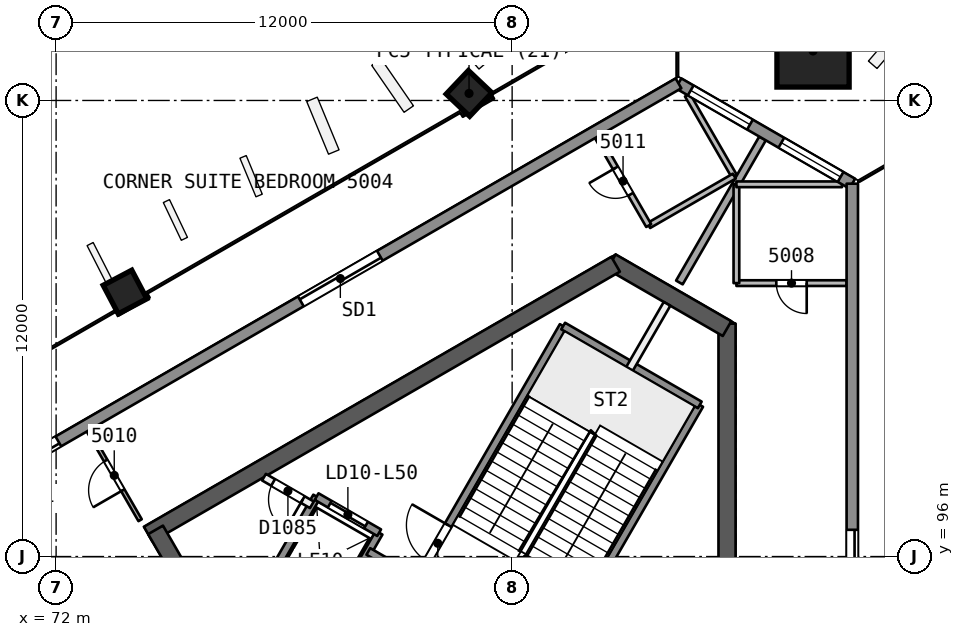
"""IFC4 building model, lengths in metres.
Left out: names, types, materials, properties, quantities, classifications, styles, units other than length and angle.
Written with IfcOpenShell. Run it as: python <this file> out.ifc"""

import sys

from ifc_helpers import new_model, si_unit, direction, frame, frame_2d, origin, origin_2d, place, context, subcontext, project, spatial, rectangle, extrude, element, fill, save


model = new_model("IFC4")
c1 = context("Model", 3, precision=1e-05, world=origin(), true_north=direction((0.0, 1.0)))
c2 = subcontext(c1, "Body", "Model", "MODEL_VIEW")
j1 = project(units=[si_unit("LENGTHUNIT", "METRE"), si_unit("PLANEANGLEUNIT", "RADIAN")], contexts=[c1])
p1 = place(None, origin())
s1 = spatial("IfcSite", under=j1, at=p1, CompositionType="ELEMENT")
p2 = place(p1, origin())
s2 = spatial("IfcBuilding", under=s1, at=p2, CompositionType="ELEMENT")
p3 = place(p2, frame((0.0, 0.0, 205.8)))
s3 = spatial("IfcBuildingStorey", under=s2, at=p3, CompositionType="ELEMENT", Elevation=205.8)
p4 = place(p3, frame((89.655, 88.019, 0.0), z_axis=(0.0, 0.0, 1.0), x_axis=(0.0, 1.0, 0.0)))
e1 = element("IfcWall", 1, at=p4, inside=s3, PredefinedType="SHEAR", context=c2, shape_type="SweptSolid", body=[
    extrude(rectangle(XDim=14.108, YDim=0.45, at=frame_2d((7.054, 0.0))), origin(), (0.0, 0.0, 1.0), 3.7),
])
p5 = place(p3, frame((89.655, 101.998, 0.0), z_axis=(0.0, 0.0, 1.0), x_axis=(-0.866042179588, 0.49997094233, 0.0)))
e2 = element("IfcWall", 2, at=p5, inside=s3, PredefinedType="SHEAR", context=c2, shape_type="SweptSolid", body=[
    extrude(rectangle(XDim=3.515, YDim=0.45, at=frame_2d((1.758, 0.0))), origin(), (0.0, 0.0, 1.0), 3.7),
])
p6 = place(p3, frame((86.723, 103.69, 0.0), z_axis=(0.0, 0.0, 1.0), x_axis=(-0.866022713978, -0.500004658852, 0.0)))
e3 = element("IfcWall", 3, at=p6, inside=s3, PredefinedType="SHEAR", context=c2, shape_type="SweptSolid", body=[
    extrude(rectangle(XDim=14.203, YDim=0.45, at=frame_2d((7.102, 0.0))), origin(), (0.0, 0.0, 1.0), 3.7),
])
p7 = place(p3, frame((74.617, 96.701, 0.0), z_axis=(0.0, 0.0, 1.0), x_axis=(0.499994385119, -0.866028645513, 0.0)))
e4 = element("IfcWall", 4, at=p7, inside=s3, PredefinedType="SHEAR", context=c2, shape_type="SweptSolid", body=[
    extrude(rectangle(XDim=10.155, YDim=0.45, at=frame_2d((5.077, 0.0))), origin(), (0.0, 0.0, 1.0), 3.7),
])
p8 = place(p7, frame((8.005, 0.0, 0.0)))
e5 = element("IfcOpeningElement", 5, at=p8, cuts=e4, PredefinedType="OPENING", context=c2, shape_type="SweptSolid", body=[
    extrude(rectangle(XDim=1.2, YDim=2.1, at=frame_2d((0.6, 1.05))), frame((0.0, 0.235, 0.0), z_axis=(0.0, -1.0, 0.0), x_axis=(1.0, 0.0, 0.0)), (0.0, 0.0, 1.0), 0.471),
])
p9 = place(p3, frame((91.939, 109.339, 0.0), z_axis=(-0.017607037296, -0.030466109479, 0.999380712447), x_axis=(0.500064653071, 0.865272876704, 0.035187946645)))
e6 = element("IfcColumn", 6, at=p9, inside=s3, PredefinedType="COLUMN", context=c2, shape_type="SweptSolid", body=[
    extrude(rectangle(XDim=1.9, YDim=1.9, at=origin_2d()), origin(), (0.0, 0.0, 1.0), 3.702),
])
p10 = place(p3, frame((82.876, 108.219, 0.0), z_axis=(-0.008376454378, -0.028163354484, 0.999568237028), x_axis=(0.86585218107, 0.499844611273, 0.021339285781)))
e7 = element("IfcColumn", 7, at=p10, inside=s3, PredefinedType="COLUMN", context=c2, shape_type="SweptSolid", body=[
    extrude(rectangle(XDim=0.85, YDim=0.85, at=origin_2d()), origin(), (0.0, 0.0, 1.0), 3.702),
])
p11 = place(p3, frame((73.813, 102.987, 0.0), z_axis=(0.000857578916, -0.022824792675, 0.999739112668), x_axis=(0.866059992904, 0.499826241631, 0.010668498825)))
e8 = element("IfcColumn", 8, at=p11, inside=s3, PredefinedType="COLUMN", context=c2, shape_type="SweptSolid", body=[
    extrude(rectangle(XDim=0.85, YDim=0.85, at=origin_2d()), origin(), (0.0, 0.0, 1.0), 3.701),
])
p12 = place(p3, frame((92.802, 103.194, 0.0), z_axis=(0.0, 0.0, 1.0), x_axis=(-1.0, 0.0, 0.0)))
e9 = element("IfcWall", 9, at=p12, inside=s3, PredefinedType="PARTITIONING", context=c2, shape_type="SweptSolid", body=[
    extrude(rectangle(XDim=2.9, YDim=0.15, at=frame_2d((1.45, 0.0))), origin(), (0.0, 0.0, 1.0), 3.3),
])
p13 = place(p12, frame((1.05, 0.0, 0.0)))
e10 = element("IfcOpeningElement", 10, at=p13, cuts=e9, PredefinedType="OPENING", context=c2, shape_type="SweptSolid", body=[
    extrude(rectangle(XDim=0.8, YDim=2.1, at=frame_2d((0.4, 1.05))), frame((0.0, 0.085, 0.0), z_axis=(0.0, -1.0, 0.0), x_axis=(1.0, 0.0, 0.0)), (0.0, 0.0, 1.0), 0.171),
])
p14 = place(p3, frame((89.902, 103.194, 0.0), z_axis=(0.0, 0.0, 1.0), x_axis=(0.0, 1.0, 0.0)))
e11 = element("IfcWall", 11, at=p14, inside=s3, PredefinedType="PARTITIONING", context=c2, shape_type="SweptSolid", body=[
    extrude(rectangle(XDim=2.6, YDim=0.15, at=frame_2d((1.3, 0.0))), origin(), (0.0, 0.0, 1.0), 3.3),
])
p15 = place(p3, frame((89.902, 105.794, 0.0), z_axis=(0.0, 0.0, 1.0), x_axis=(1.0, 0.0, 0.0)))
e12 = element("IfcWall", 12, at=p15, inside=s3, PredefinedType="PARTITIONING", context=c2, shape_type="SweptSolid", body=[
    extrude(rectangle(XDim=2.78, YDim=0.15, at=frame_2d((1.39, 0.0))), origin(), (0.0, 0.0, 1.0), 3.3),
])
p16 = place(p3, frame((90.59, 107.002, 0.0), z_axis=(0.0, 0.0, 1.0), x_axis=(-0.500002498361, -0.86602396135, 0.0)))
e13 = element("IfcWall", 13, at=p16, inside=s3, PredefinedType="PARTITIONING", context=c2, shape_type="SweptSolid", body=[
    extrude(rectangle(XDim=4.377, YDim=0.2, at=frame_2d((2.188, 0.0))), origin(), (0.0, 0.0, 1.0), 3.3),
])
p17 = place(p3, frame((74.21, 96.956, 0.0), z_axis=(0.0, 0.0, 1.0), x_axis=(-0.499957886064, 0.866049716911, 0.0)))
e14 = element("IfcWall", 14, at=p17, inside=s3, PredefinedType="PARTITIONING", context=c2, shape_type="SweptSolid", body=[
    extrude(rectangle(XDim=2.723, YDim=0.1, at=frame_2d((1.361, 0.0))), origin(), (0.0, 0.0, 1.0), 3.3),
])
p18 = place(p17, frame((0.911, 0.0, 0.0)))
e15 = element("IfcOpeningElement", 15, at=p18, cuts=e14, PredefinedType="OPENING", context=c2, shape_type="SweptSolid", body=[
    extrude(rectangle(XDim=0.9, YDim=2.1, at=frame_2d((0.45, 1.05))), frame((0.0, 0.061, 0.0), z_axis=(0.0, -1.0, 0.0), x_axis=(1.0, 0.0, 0.0)), (0.0, 0.0, 1.0), 0.121),
])
p19 = place(p3, frame((69.339, 97.287, 0.0), z_axis=(0.0, 0.0, 1.0), x_axis=(0.499993653641, -0.866029067825, 0.0)))
e16 = element("IfcWall", 16, at=p19, inside=s3, PredefinedType="PARTITIONING", context=c2, shape_type="SweptSolid", body=[
    extrude(rectangle(XDim=10.702, YDim=0.2, at=frame_2d((5.351, 0.0))), origin(), (0.0, 0.0, 1.0), 3.3),
])
p20 = place(p3, frame((88.613, 108.143, 0.0), z_axis=(0.0, 0.0, 1.0), x_axis=(0.500028332303, -0.866009045504, 0.0)))
e17 = element("IfcWall", 17, at=p20, inside=s3, PredefinedType="PARTITIONING", context=c2, shape_type="SweptSolid", body=[
    extrude(rectangle(XDim=2.464, YDim=0.15, at=frame_2d((1.232, 0.0))), origin(), (0.0, 0.0, 1.0), 3.3),
])
p21 = place(p3, frame((89.845, 106.009, 0.0), z_axis=(0.0, 0.0, 1.0), x_axis=(-0.865997922154, -0.500047596559, 0.0)))
e18 = element("IfcWall", 18, at=p21, inside=s3, PredefinedType="PARTITIONING", context=c2, shape_type="SweptSolid", body=[
    extrude(rectangle(XDim=2.6, YDim=0.15, at=frame_2d((1.3, 0.0))), origin(), (0.0, 0.0, 1.0), 3.3),
])
p22 = place(p3, frame((87.594, 104.709, 0.0), z_axis=(0.0, 0.0, 1.0), x_axis=(-0.500077242023, 0.865980803489, 0.0)))
e19 = element("IfcWall", 19, at=p22, inside=s3, PredefinedType="PARTITIONING", context=c2, shape_type="SweptSolid", body=[
    extrude(rectangle(XDim=2.7, YDim=0.15, at=frame_2d((1.35, 0.0))), origin(), (0.0, 0.0, 1.0), 3.3),
])
p23 = place(p22, frame((0.95, 0.0, 0.0)))
e20 = element("IfcOpeningElement", 20, at=p23, cuts=e19, PredefinedType="OPENING", context=c2, shape_type="SweptSolid", body=[
    extrude(rectangle(XDim=0.8, YDim=2.1, at=frame_2d((0.4, 1.05))), frame((0.0, 0.085, 0.0), z_axis=(0.0, -1.0, 0.0), x_axis=(1.0, 0.0, 0.0)), (0.0, 0.0, 1.0), 0.171),
])
p24 = place(p3, frame((88.377, 108.451, 0.0), z_axis=(0.0, 0.0, 1.0), x_axis=(0.866015446554, -0.500017246033, 0.0)))
e21 = element("IfcWall", 21, at=p24, inside=s3, PredefinedType="SOLIDWALL", context=c2, shape_type="SweptSolid", body=[
    extrude(rectangle(XDim=5.281, YDim=0.3, at=frame_2d((2.641, 0.0))), origin(), (0.0, 0.0, 1.0), 3.3),
])
p25 = place(p24, frame((3.126, 0.0, 0.9)))
e22 = element("IfcOpeningElement", 22, at=p25, cuts=e21, PredefinedType="OPENING", context=c2, shape_type="SweptSolid", body=[
    extrude(rectangle(XDim=1.8, YDim=1.5, at=frame_2d((0.9, 0.75))), frame((0.0, 0.161, 0.0), z_axis=(0.0, -1.0, 0.0), x_axis=(1.0, 0.0, 0.0)), (0.0, 0.0, 1.0), 0.321),
])
p26 = place(p24, frame((0.372, 0.0, 0.9)))
e23 = element("IfcOpeningElement", 23, at=p26, cuts=e21, PredefinedType="OPENING", context=c2, shape_type="SweptSolid", body=[
    extrude(rectangle(XDim=1.8, YDim=1.5, at=frame_2d((0.9, 0.75))), frame((0.0, 0.161, 0.0), z_axis=(0.0, -1.0, 0.0), x_axis=(1.0, 0.0, 0.0)), (0.0, 0.0, 1.0), 0.321),
])
p27 = place(p3, frame((92.951, 105.811, 0.0), z_axis=(0.0, 0.0, 1.0), x_axis=(0.0, -1.0, 0.0)))
e24 = element("IfcWall", 24, at=p27, inside=s3, PredefinedType="SOLIDWALL", context=c2, shape_type="SweptSolid", body=[
    extrude(rectangle(XDim=51.621, YDim=0.3, at=frame_2d((25.811, 0.0))), origin(), (0.0, 0.0, 1.0), 3.3),
])
p28 = place(p27, frame((24.299, 0.0, 0.0)))
e25 = element("IfcOpeningElement", 25, at=p28, cuts=e24, PredefinedType="OPENING", context=c2, shape_type="SweptSolid", body=[
    extrude(rectangle(XDim=2.4, YDim=2.4, at=frame_2d((1.2, 1.2))), frame((0.0, 0.161, 0.0), z_axis=(0.0, -1.0, 0.0), x_axis=(1.0, 0.0, 0.0)), (0.0, 0.0, 1.0), 0.321),
])
p29 = place(p27, frame((29.287, 0.0, 0.0)))
e26 = element("IfcOpeningElement", 26, at=p29, cuts=e24, PredefinedType="OPENING", context=c2, shape_type="SweptSolid", body=[
    extrude(rectangle(XDim=2.4, YDim=2.4, at=frame_2d((1.2, 1.2))), frame((0.0, 0.161, 0.0), z_axis=(0.0, -1.0, 0.0), x_axis=(1.0, 0.0, 0.0)), (0.0, 0.0, 1.0), 0.321),
])
p30 = place(p27, frame((40.147, 0.0, 0.0)))
e27 = element("IfcOpeningElement", 27, at=p30, cuts=e24, PredefinedType="OPENING", context=c2, shape_type="SweptSolid", body=[
    extrude(rectangle(XDim=2.4, YDim=2.4, at=frame_2d((1.2, 1.2))), frame((0.0, 0.161, 0.0), z_axis=(0.0, -1.0, 0.0), x_axis=(1.0, 0.0, 0.0)), (0.0, 0.0, 1.0), 0.321),
])
p31 = place(p27, frame((19.622, 0.0, 0.0)))
e28 = element("IfcOpeningElement", 28, at=p31, cuts=e24, PredefinedType="OPENING", context=c2, shape_type="SweptSolid", body=[
    extrude(rectangle(XDim=2.4, YDim=2.4, at=frame_2d((1.2, 1.2))), frame((0.0, 0.161, 0.0), z_axis=(0.0, -1.0, 0.0), x_axis=(1.0, 0.0, 0.0)), (0.0, 0.0, 1.0), 0.321),
])
p32 = place(p27, frame((9.107, 0.0, 0.0)))
e29 = element("IfcOpeningElement", 29, at=p32, cuts=e24, PredefinedType="OPENING", context=c2, shape_type="SweptSolid", body=[
    extrude(rectangle(XDim=2.4, YDim=2.4, at=frame_2d((1.2, 1.2))), frame((0.0, 0.161, 0.0), z_axis=(0.0, -1.0, 0.0), x_axis=(1.0, 0.0, 0.0)), (0.0, 0.0, 1.0), 0.321),
])
p33 = place(p3, frame((43.672, 82.641, 0.0), z_axis=(0.0, 0.0, 1.0), x_axis=(0.866024917385, 0.500000842468, 0.0)))
e30 = element("IfcWall", 30, at=p33, inside=s3, PredefinedType="SOLIDWALL", context=c2, shape_type="SweptSolid", body=[
    extrude(rectangle(XDim=51.621, YDim=0.3, at=frame_2d((25.811, 0.0))), origin(), (0.0, 0.0, 1.0), 3.3),
])
p34 = place(p33, frame((24.611, 0.0, 0.0)))
e31 = element("IfcOpeningElement", 31, at=p34, cuts=e30, PredefinedType="OPENING", context=c2, shape_type="SweptSolid", body=[
    extrude(rectangle(XDim=2.4, YDim=2.4, at=frame_2d((1.2, 1.2))), frame((0.0, 0.161, 0.0), z_axis=(0.0, -1.0, 0.0), x_axis=(1.0, 0.0, 0.0)), (0.0, 0.0, 1.0), 0.321),
])
p35 = place(p33, frame((30.378, 0.0, 0.0)))
e32 = element("IfcOpeningElement", 32, at=p35, cuts=e30, PredefinedType="OPENING", context=c2, shape_type="SweptSolid", body=[
    extrude(rectangle(XDim=2.4, YDim=2.4, at=frame_2d((1.2, 1.2))), frame((0.0, 0.161, 0.0), z_axis=(0.0, -1.0, 0.0), x_axis=(1.0, 0.0, 0.0)), (0.0, 0.0, 1.0), 0.321),
])
p36 = place(p33, frame((40.147, 0.0, 0.0)))
e33 = element("IfcOpeningElement", 33, at=p36, cuts=e30, PredefinedType="OPENING", context=c2, shape_type="SweptSolid", body=[
    extrude(rectangle(XDim=2.4, YDim=2.4, at=frame_2d((1.2, 1.2))), frame((0.0, 0.161, 0.0), z_axis=(0.0, -1.0, 0.0), x_axis=(1.0, 0.0, 0.0)), (0.0, 0.0, 1.0), 0.321),
])
p37 = place(p33, frame((18.843, 0.0, 0.0)))
e34 = element("IfcOpeningElement", 34, at=p37, cuts=e30, PredefinedType="OPENING", context=c2, shape_type="SweptSolid", body=[
    extrude(rectangle(XDim=2.4, YDim=2.4, at=frame_2d((1.2, 1.2))), frame((0.0, 0.161, 0.0), z_axis=(0.0, -1.0, 0.0), x_axis=(1.0, 0.0, 0.0)), (0.0, 0.0, 1.0), 0.321),
])
p38 = place(p33, frame((9.107, 0.0, 0.0)))
e35 = element("IfcOpeningElement", 35, at=p38, cuts=e30, PredefinedType="OPENING", context=c2, shape_type="SweptSolid", body=[
    extrude(rectangle(XDim=2.4, YDim=2.4, at=frame_2d((1.2, 1.2))), frame((0.0, 0.161, 0.0), z_axis=(0.0, -1.0, 0.0), x_axis=(1.0, 0.0, 0.0)), (0.0, 0.0, 1.0), 0.321),
])
p39 = place(p3, frame((85.087, 93.321, 0.0), z_axis=(0.0, 0.0, 1.0), x_axis=(0.500019787375, 0.866013979237, 0.0)))
e36 = element("IfcWall", 36, at=p39, inside=s3, PredefinedType="SOLIDWALL", context=c2, shape_type="SweptSolid", body=[
    extrude(rectangle(XDim=7.7, YDim=0.2, at=frame_2d((3.85, 0.0))), origin(), (0.0, 0.0, 1.0), 3.3),
])
p40 = place(p3, frame((87.09, 100.94, 0.0), z_axis=(0.0, 0.0, 1.0), x_axis=(0.500011643316, 0.866018681408, 0.0)))
e37 = element("IfcWall", 37, at=p40, inside=s3, PredefinedType="PARTITIONING", context=c2, shape_type="SweptSolid", body=[
    extrude(rectangle(XDim=1.973, YDim=0.2, at=frame_2d((0.987, 0.0))), origin(), (0.0, 0.0, 1.0), 3.3),
])
p41 = place(p3, frame((81.493, 95.396, 0.0), z_axis=(0.0, 0.0, 1.0), x_axis=(0.500006057782, 0.866021906294, 0.0)))
e38 = element("IfcWall", 38, at=p41, inside=s3, PredefinedType="SOLIDWALL", context=c2, shape_type="SweptSolid", body=[
    extrude(rectangle(XDim=7.7, YDim=0.2, at=frame_2d((3.85, 0.0))), origin(), (0.0, 0.0, 1.0), 3.3),
])
p42 = place(p41, frame((0.55, 0.0, 0.0)))
e39 = element("IfcOpeningElement", 39, at=p42, cuts=e38, PredefinedType="OPENING", context=c2, shape_type="SweptSolid", body=[
    extrude(rectangle(XDim=1.1, YDim=2.1, at=frame_2d((0.55, 1.05))), frame((0.0, 0.11, 0.0), z_axis=(0.0, -1.0, 0.0), x_axis=(1.0, 0.0, 0.0)), (0.0, 0.0, 1.0), 0.221),
])
for number, where, z_axis, x_axis in (
    (40, (78.976, 93.986, 0.0), (0.0, 0.0, 1.0), (0.5, 0.866, 0.0)),
    (41, (77.33, 94.936, 0.0), (0.0, 0.0, 1.0), (0.5, 0.866, 0.0)),
):
    element("IfcWall", number, at=place(p3, frame(where, z_axis=z_axis, x_axis=x_axis)), inside=s3, PredefinedType="SOLIDWALL", context=c2, shape_type="SweptSolid", body=[
        extrude(rectangle(XDim=3.05, YDim=0.2, at=frame_2d((1.525, 0.0))), origin(), (0.0, 0.0, 1.0), 3.3),
    ])
p43 = place(p3, frame((89.43, 90.814, 0.0), z_axis=(0.0, 0.0, 1.0), x_axis=(-0.866018983788, 0.500011119594, 0.0)))
e42 = element("IfcWall", 42, at=p43, inside=s3, PredefinedType="SOLIDWALL", context=c2, shape_type="SweptSolid", body=[
    extrude(rectangle(XDim=10.64, YDim=0.2, at=frame_2d((5.32, 0.0))), origin(), (0.0, 0.0, 1.0), 3.3),
])
p44 = place(p43, frame((0.37, 0.0, 0.0)))
e43 = element("IfcOpeningElement", 43, at=p44, cuts=e42, PredefinedType="OPENING", context=c2, shape_type="SweptSolid", body=[
    extrude(rectangle(XDim=0.9, YDim=2.1, at=frame_2d((0.45, 1.05))), frame((0.0, 0.11, 0.0), z_axis=(0.0, -1.0, 0.0), x_axis=(1.0, 0.0, 0.0)), (0.0, 0.0, 1.0), 0.221),
])
p45 = place(p3, frame((78.73, 97.361, 0.0), z_axis=(0.0, 0.0, 1.0), x_axis=(-0.866045896294, 0.499964504253, 0.0)))
e44 = element("IfcWall", 44, at=p45, inside=s3, PredefinedType="PARTITIONING", context=c2, shape_type="SweptSolid", body=[
    extrude(rectangle(XDim=1.455, YDim=0.2, at=frame_2d((0.728, 0.0))), origin(), (0.0, 0.0, 1.0), 3.3),
])
p46 = place(p45, frame((0.278, 0.0, 0.0)))
e45 = element("IfcOpeningElement", 45, at=p46, cuts=e44, PredefinedType="OPENING", context=c2, shape_type="SweptSolid", body=[
    extrude(rectangle(XDim=0.9, YDim=2.1, at=frame_2d((0.45, 1.05))), frame((0.0, 0.11, 0.0), z_axis=(0.0, -1.0, 0.0), x_axis=(1.0, 0.0, 0.0)), (0.0, 0.0, 1.0), 0.221),
])
p47 = place(p3, frame((80.5, 96.627, 0.0), z_axis=(0.0, 0.0, 1.0), x_axis=(-0.86601224135, 0.500022797313, 0.0)))
e46 = element("IfcWall", 46, at=p47, inside=s3, PredefinedType="SOLIDWALL", context=c2, shape_type="SweptSolid", body=[
    extrude(rectangle(XDim=1.9, YDim=0.2, at=frame_2d((0.95, 0.0))), origin(), (0.0, 0.0, 1.0), 3.3),
])
p48 = place(p47, frame((0.4, 0.0, 0.0)))
e47 = element("IfcOpeningElement", 47, at=p48, cuts=e46, PredefinedType="OPENING", context=c2, shape_type="SweptSolid", body=[
    extrude(rectangle(XDim=1.1, YDim=2.1, at=frame_2d((0.55, 1.05))), frame((0.0, 0.11, 0.0), z_axis=(0.0, -1.0, 0.0), x_axis=(1.0, 0.0, 0.0)), (0.0, 0.0, 1.0), 0.221),
])
p49 = place(p3, frame((88.937, 99.99, 0.0), z_axis=(0.0, 0.0, 1.0), x_axis=(-0.866004344652, 0.500036473714, 0.0)))
e48 = element("IfcWall", 48, at=p49, inside=s3, PredefinedType="SOLIDWALL", context=c2, shape_type="SweptSolid", body=[
    extrude(rectangle(XDim=4.15, YDim=0.2, at=frame_2d((2.075, 0.0))), origin(), (0.0, 0.0, 1.0), 3.3),
])
p50 = place(p13, origin())
e49 = element("IfcDoor", 49, at=p50, inside=s3, OperationType="SINGLE_SWING_LEFT", PredefinedType="NOTDEFINED", context=c2, shape_type="SweptSolid", body=[
    extrude(rectangle(XDim=0.8, YDim=2.1, at=frame_2d((0.4, 1.05))), frame((0.0, 0.025, 0.0), z_axis=(0.0, -1.0, 0.0), x_axis=(1.0, 0.0, 0.0)), (0.0, 0.0, 1.0), 0.05),
])
fill(e10, e49)
p51 = place(p18, origin())
e50 = element("IfcDoor", 50, at=p51, inside=s3, OperationType="SINGLE_SWING_LEFT", PredefinedType="NOTDEFINED", context=c2, shape_type="SweptSolid", body=[
    extrude(rectangle(XDim=0.9, YDim=2.1, at=frame_2d((0.45, 1.05))), frame((0.0, 0.025, 0.0), z_axis=(0.0, -1.0, 0.0), x_axis=(1.0, 0.0, 0.0)), (0.0, 0.0, 1.0), 0.05),
])
fill(e15, e50)
p52 = place(p23, origin())
e51 = element("IfcDoor", 51, at=p52, inside=s3, OperationType="SINGLE_SWING_RIGHT", PredefinedType="NOTDEFINED", context=c2, shape_type="SweptSolid", body=[
    extrude(rectangle(XDim=0.8, YDim=2.1, at=frame_2d((0.4, 1.05))), frame((0.0, 0.025, 0.0), z_axis=(0.0, -1.0, 0.0), x_axis=(1.0, 0.0, 0.0)), (0.0, 0.0, 1.0), 0.05),
])
fill(e20, e51)
p53 = place(p25, origin())
e52 = element("IfcWindow", 52, at=p53, inside=s3, PartitioningType="SINGLE_PANEL", PredefinedType="WINDOW", context=c2, shape_type="SweptSolid", body=[
    extrude(rectangle(XDim=1.8, YDim=1.5, at=frame_2d((0.9, 0.75))), frame((0.0, 0.03, 0.0), z_axis=(0.0, -1.0, 0.0), x_axis=(1.0, 0.0, 0.0)), (0.0, 0.0, 1.0), 0.06),
])
fill(e22, e52)
p54 = place(p26, origin())
e53 = element("IfcWindow", 53, at=p54, inside=s3, PartitioningType="SINGLE_PANEL", PredefinedType="WINDOW", context=c2, shape_type="SweptSolid", body=[
    extrude(rectangle(XDim=1.8, YDim=1.5, at=frame_2d((0.9, 0.75))), frame((0.0, 0.03, 0.0), z_axis=(0.0, -1.0, 0.0), x_axis=(1.0, 0.0, 0.0)), (0.0, 0.0, 1.0), 0.06),
])
fill(e23, e53)
p55 = place(p32, origin())
e54 = element("IfcDoor", 54, at=p55, inside=s3, OperationType="SLIDING_TO_LEFT", PredefinedType="NOTDEFINED", context=c2, shape_type="SweptSolid", body=[
    extrude(rectangle(XDim=2.4, YDim=2.4, at=frame_2d((1.2, 1.2))), frame((0.0, 0.025, 0.0), z_axis=(0.0, -1.0, 0.0), x_axis=(1.0, 0.0, 0.0)), (0.0, 0.0, 1.0), 0.05),
])
fill(e29, e54)
p56 = place(p35, origin())
e55 = element("IfcDoor", 55, at=p56, inside=s3, OperationType="SLIDING_TO_RIGHT", PredefinedType="NOTDEFINED", context=c2, shape_type="SweptSolid", body=[
    extrude(rectangle(XDim=2.4, YDim=2.4, at=frame_2d((1.2, 1.2))), frame((0.0, 0.025, 0.0), z_axis=(0.0, -1.0, 0.0), x_axis=(1.0, 0.0, 0.0)), (0.0, 0.0, 1.0), 0.05),
])
fill(e32, e55)
p57 = place(p36, origin())
e56 = element("IfcDoor", 56, at=p57, inside=s3, OperationType="SLIDING_TO_LEFT", PredefinedType="NOTDEFINED", context=c2, shape_type="SweptSolid", body=[
    extrude(rectangle(XDim=2.4, YDim=2.4, at=frame_2d((1.2, 1.2))), frame((0.0, 0.025, 0.0), z_axis=(0.0, -1.0, 0.0), x_axis=(1.0, 0.0, 0.0)), (0.0, 0.0, 1.0), 0.05),
])
fill(e33, e56)
p58 = place(p48, origin())
e57 = element("IfcDoor", 57, at=p58, inside=s3, OperationType="SLIDING_TO_RIGHT", PredefinedType="NOTDEFINED", context=c2, shape_type="SweptSolid", body=[
    extrude(rectangle(XDim=1.1, YDim=2.1, at=frame_2d((0.55, 1.05))), frame((0.0, 0.025, 0.0), z_axis=(0.0, -1.0, 0.0), x_axis=(1.0, 0.0, 0.0)), (0.0, 0.0, 1.0), 0.05),
])
fill(e47, e57)
p59 = place(p46, origin())
e58 = element("IfcDoor", 58, at=p59, inside=s3, OperationType="SINGLE_SWING_LEFT", PredefinedType="NOTDEFINED", context=c2, shape_type="SweptSolid", body=[
    extrude(rectangle(XDim=0.9, YDim=2.1, at=frame_2d((0.45, 1.05))), frame((0.0, 0.025, 0.0), z_axis=(0.0, -1.0, 0.0), x_axis=(1.0, 0.0, 0.0)), (0.0, 0.0, 1.0), 0.05),
])
fill(e45, e58)
p60 = place(p42, origin())
e59 = element("IfcDoor", 59, at=p60, inside=s3, OperationType="SINGLE_SWING_RIGHT", PredefinedType="NOTDEFINED", context=c2, shape_type="SweptSolid", body=[
    extrude(rectangle(XDim=1.1, YDim=2.1, at=frame_2d((0.55, 1.05))), frame((0.0, 0.025, 0.0), z_axis=(0.0, -1.0, 0.0), x_axis=(1.0, 0.0, 0.0)), (0.0, 0.0, 1.0), 0.05),
])
fill(e39, e59)
save(model, sys.argv[1])
